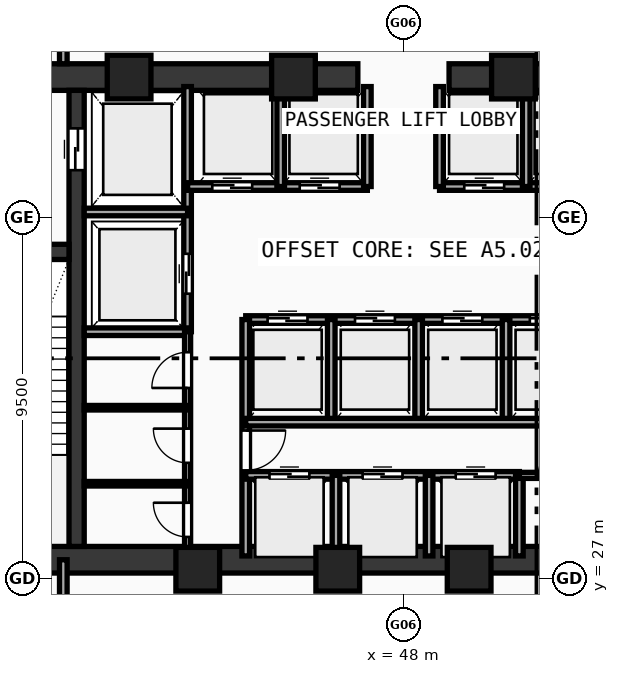
"""IFC4 building model, lengths in metres.
Left out: names, types, materials, properties, quantities, classifications, styles, units other than length and angle.
Written with IfcOpenShell. Run it as: python <this file> out.ifc"""

import sys

from ifc_helpers import new_model, si_unit, direction, frame, frame_2d, origin, origin_with_axes, origin_2d, place, context, subcontext, project, spatial, rectangle, hollow_rectangle, extrude, source, transform, mapped, element, fill, save


model = new_model("IFC4")
c1 = context("Model", 3, precision=1e-05, world=origin(), true_north=direction((0.0, 1.0)))
c2 = subcontext(c1, "Body", "Model", "MODEL_VIEW")
j1 = project(units=[si_unit("LENGTHUNIT", "METRE"), si_unit("PLANEANGLEUNIT", "RADIAN")], contexts=[c1])
p1 = place(None, origin())
s1 = spatial("IfcSite", under=j1, at=p1, CompositionType="ELEMENT")
p2 = place(p1, origin())
s2 = spatial("IfcBuilding", under=s1, at=p2, CompositionType="ELEMENT")
p3 = place(p2, origin())
s3 = spatial("IfcBuildingStorey", under=s2, at=p3, CompositionType="ELEMENT", Elevation=0.0)
p4 = place(p3, frame((35.45, 27.5, 0.0), z_axis=(0.0, 0.0, 1.0), x_axis=(1.0, 0.0, 0.0)))
e1 = element("IfcWall", 1, at=p4, inside=s3, PredefinedType="SHEAR", context=c2, shape_type="SweptSolid", body=[
    extrude(rectangle(XDim=25.1, YDim=0.7, at=frame_2d((12.55, 0.0))), origin(), (0.0, 0.0, 1.0), 4.52),
])
p5 = place(p3, frame((35.45, 40.2, 0.0), z_axis=(0.0, 0.0, 1.0), x_axis=(1.0, 0.0, 0.0)))
e2 = element("IfcWall", 2, at=p5, inside=s3, PredefinedType="SHEAR", context=c2, shape_type="SweptSolid", body=[
    extrude(rectangle(XDim=11.35, YDim=0.7, at=frame_2d((5.675, 0.0))), origin(), (0.0, 0.0, 1.0), 4.52),
])
p6 = place(p5, frame((1.7, 0.0, 0.0)))
e3 = element("IfcOpeningElement", 3, at=p6, cuts=e2, PredefinedType="OPENING", context=c2, shape_type="SweptSolid", body=[
    extrude(rectangle(XDim=1.05, YDim=2.1, at=frame_2d((0.525, 1.05))), frame((0.0, 0.36, 0.0), z_axis=(0.0, -1.0, 0.0), x_axis=(1.0, 0.0, 0.0)), (0.0, 0.0, 1.0), 0.72),
])
p7 = place(p3, frame((49.2, 40.2, 0.0), z_axis=(0.0, 0.0, 1.0), x_axis=(1.0, 0.0, 0.0)))
e4 = element("IfcWall", 4, at=p7, inside=s3, PredefinedType="SHEAR", context=c2, shape_type="SweptSolid", body=[
    extrude(rectangle(XDim=11.35, YDim=0.7, at=frame_2d((5.675, 0.0))), origin(), (0.0, 0.0, 1.0), 4.52),
])
p8 = place(p7, frame((8.6, 0.0, 0.0)))
e5 = element("IfcOpeningElement", 5, at=p8, cuts=e4, PredefinedType="OPENING", context=c2, shape_type="SweptSolid", body=[
    extrude(rectangle(XDim=1.05, YDim=2.1, at=frame_2d((0.525, 1.05))), frame((0.0, 0.36, 0.0), z_axis=(0.0, -1.0, 0.0), x_axis=(1.0, 0.0, 0.0)), (0.0, 0.0, 1.0), 0.72),
])
p9 = place(p3, frame((39.4, 27.85, 0.0), z_axis=(0.0, 0.0, 1.0), x_axis=(0.0, 1.0, 0.0)))
e6 = element("IfcWall", 6, at=p9, inside=s3, PredefinedType="SHEAR", context=c2, shape_type="SweptSolid", body=[
    extrude(rectangle(XDim=12.0, YDim=0.4, at=frame_2d((6.0, 0.0))), origin(), (0.0, 0.0, 1.0), 4.52),
])
p10 = place(p9, frame((9.9, 0.0, 0.0)))
e7 = element("IfcOpeningElement", 7, at=p10, cuts=e6, PredefinedType="OPENING", context=c2, shape_type="SweptSolid", body=[
    extrude(rectangle(XDim=1.1, YDim=2.1, at=frame_2d((0.55, 1.05))), frame((0.0, 0.21, 0.0), z_axis=(0.0, -1.0, 0.0), x_axis=(1.0, 0.0, 0.0)), (0.0, 0.0, 1.0), 0.42),
])
p11 = place(p3, frame((36.15, 35.6, 0.0), z_axis=(0.0, 0.0, 1.0), x_axis=(1.0, 0.0, 0.0)))
e8 = element("IfcWall", 8, at=p11, inside=s3, PredefinedType="SHEAR", context=c2, shape_type="SweptSolid", body=[
    extrude(rectangle(XDim=3.05, YDim=0.4, at=frame_2d((1.525, 0.0))), origin(), (0.0, 0.0, 1.0), 4.52),
])
p12 = place(p11, frame((0.97, 0.0, 0.0)))
e9 = element("IfcOpeningElement", 9, at=p12, cuts=e8, PredefinedType="OPENING", context=c2, shape_type="SweptSolid", body=[
    extrude(rectangle(XDim=1.05, YDim=2.1, at=frame_2d((0.525, 1.05))), frame((0.0, 0.21, 0.0), z_axis=(0.0, -1.0, 0.0), x_axis=(1.0, 0.0, 0.0)), (0.0, 0.0, 1.0), 0.42),
])
m1 = source(origin(), c2, "Body", "SweptSolid", [
    extrude(hollow_rectangle(XDim=1.15, YDim=1.15, WallThickness=0.048, at=origin_2d()), origin(), (0.0, 0.0, 1.0), 4.8),
])
for number, where, z_axis, x_axis in (
    (10, (42.588, 27.25, -0.28), (0.0, 0.0, 1.0), (1.0, 0.0, 0.0)),
    (11, (46.272, 27.25, -0.28), (0.0, 0.0, 1.0), (1.0, 0.0, 0.0)),
    (12, (49.729, 27.25, -0.28), (0.0, 0.0, 1.0), (1.0, 0.0, 0.0)),
    (13, (50.894, 40.2, -0.28), (0.0, 0.0, 1.0), (1.0, 0.0, 0.0)),
    (14, (45.106, 40.2, -0.28), (0.0, 0.0, 1.0), (1.0, 0.0, 0.0)),
    (15, (40.781, 40.2, -0.28), (0.0, 0.0, 1.0), (1.0, 0.0, 0.0)),
):
    element("IfcColumn", number, at=place(p3, frame(where, z_axis=z_axis, x_axis=x_axis)), inside=s3, PredefinedType="COLUMN", context=c2, shape_type="MappedRepresentation", body=[
        mapped(m1, transform((0.0, 0.0, 0.0), scale=1.0)),
    ])
p13 = place(p3, frame((42.32, 33.5, 0.0), z_axis=(0.0, 0.0, 1.0), x_axis=(0.0, 1.0, 0.0)))
e16 = element("IfcWall", 16, at=p13, inside=s3, PredefinedType="SOLIDWALL", context=c2, shape_type="SweptSolid", body=[
    extrude(rectangle(XDim=6.45, YDim=0.2, at=frame_2d((3.225, 0.0))), origin(), (0.0, 0.0, 1.0), 4.52),
])
p14 = place(p13, frame((1.0, 0.0, 0.0)))
e17 = element("IfcOpeningElement", 17, at=p14, cuts=e16, PredefinedType="OPENING", context=c2, shape_type="SweptSolid", body=[
    extrude(rectangle(XDim=1.05, YDim=2.1, at=frame_2d((0.525, 1.05))), frame((0.0, 0.11, 0.0), z_axis=(0.0, -1.0, 0.0), x_axis=(1.0, 0.0, 0.0)), (0.0, 0.0, 1.0), 0.22),
])
for number, where, z_axis, x_axis in (
    (18, (39.6, 36.65, 0.0), (0.0, 0.0, 1.0), (1.0, 0.0, 0.0)),
    (19, (39.6, 33.5, 0.0), (0.0, 0.0, 1.0), (1.0, 0.0, 0.0)),
):
    element("IfcWall", number, at=place(p3, frame(where, z_axis=z_axis, x_axis=x_axis)), inside=s3, PredefinedType="SOLIDWALL", context=c2, shape_type="SweptSolid", body=[
        extrude(rectangle(XDim=2.72, YDim=0.2, at=frame_2d((1.36, 0.0))), origin(), (0.0, 0.0, 1.0), 4.52),
    ])
p15 = place(p3, frame((42.32, 37.32, 0.0), z_axis=(0.0, 0.0, 1.0), x_axis=(1.0, 0.0, 0.0)))
e20 = element("IfcWall", 20, at=p15, inside=s3, PredefinedType="SOLIDWALL", context=c2, shape_type="SweptSolid", body=[
    extrude(rectangle(XDim=4.73, YDim=0.2, at=frame_2d((2.365, 0.0))), origin(), (0.0, 0.0, 1.0), 4.52),
])
p16 = place(p15, frame((0.65, 0.0, 0.0)))
e21 = element("IfcOpeningElement", 21, at=p16, cuts=e20, PredefinedType="OPENING", context=c2, shape_type="SweptSolid", body=[
    extrude(rectangle(XDim=1.05, YDim=2.1, at=frame_2d((0.525, 1.05))), frame((0.0, 0.11, 0.0), z_axis=(0.0, -1.0, 0.0), x_axis=(1.0, 0.0, 0.0)), (0.0, 0.0, 1.0), 0.22),
])
p17 = place(p15, frame((2.95, 0.0, 0.0)))
e22 = element("IfcOpeningElement", 22, at=p17, cuts=e20, PredefinedType="OPENING", context=c2, shape_type="SweptSolid", body=[
    extrude(rectangle(XDim=1.05, YDim=2.1, at=frame_2d((0.525, 1.05))), frame((0.0, 0.11, 0.0), z_axis=(0.0, -1.0, 0.0), x_axis=(1.0, 0.0, 0.0)), (0.0, 0.0, 1.0), 0.22),
])
p18 = place(p3, frame((48.95, 37.32, 0.0), z_axis=(0.0, 0.0, 1.0), x_axis=(1.0, 0.0, 0.0)))
e23 = element("IfcWall", 23, at=p18, inside=s3, PredefinedType="SOLIDWALL", context=c2, shape_type="SweptSolid", body=[
    extrude(rectangle(XDim=4.73, YDim=0.2, at=frame_2d((2.365, 0.0))), origin(), (0.0, 0.0, 1.0), 4.52),
])
p19 = place(p18, frame((0.65, 0.0, 0.0)))
e24 = element("IfcOpeningElement", 24, at=p19, cuts=e23, PredefinedType="OPENING", context=c2, shape_type="SweptSolid", body=[
    extrude(rectangle(XDim=1.05, YDim=2.1, at=frame_2d((0.525, 1.05))), frame((0.0, 0.11, 0.0), z_axis=(0.0, -1.0, 0.0), x_axis=(1.0, 0.0, 0.0)), (0.0, 0.0, 1.0), 0.22),
])
p20 = place(p18, frame((2.95, 0.0, 0.0)))
e25 = element("IfcOpeningElement", 25, at=p20, cuts=e23, PredefinedType="OPENING", context=c2, shape_type="SweptSolid", body=[
    extrude(rectangle(XDim=1.05, YDim=2.1, at=frame_2d((0.525, 1.05))), frame((0.0, 0.11, 0.0), z_axis=(0.0, -1.0, 0.0), x_axis=(1.0, 0.0, 0.0)), (0.0, 0.0, 1.0), 0.22),
])
for number, where, z_axis, x_axis in (
    (26, (47.05, 37.32, 0.0), (0.0, 0.0, 1.0), (0.0, 1.0, 0.0)),
    (27, (48.95, 37.32, 0.0), (0.0, 0.0, 1.0), (0.0, 1.0, 0.0)),
    (28, (44.77, 37.32, 0.0), (0.0, 0.0, 1.0), (0.0, 1.0, 0.0)),
    (29, (51.23, 37.32, 0.0), (0.0, 0.0, 1.0), (0.0, 1.0, 0.0)),
):
    element("IfcWall", number, at=place(p3, frame(where, z_axis=z_axis, x_axis=x_axis)), inside=s3, PredefinedType="SOLIDWALL", context=c2, shape_type="SweptSolid", body=[
        extrude(rectangle(XDim=2.63, YDim=0.2, at=frame_2d((1.315, 0.0))), origin(), (0.0, 0.0, 1.0), 4.52),
    ])
p21 = place(p3, frame((43.85, 33.82, 0.0), z_axis=(0.0, 0.0, 1.0), x_axis=(1.0, 0.0, 0.0)))
e30 = element("IfcWall", 30, at=p21, inside=s3, PredefinedType="SOLIDWALL", context=c2, shape_type="SweptSolid", body=[
    extrude(rectangle(XDim=9.83, YDim=0.2, at=frame_2d((4.915, 0.0))), origin(), (0.0, 0.0, 1.0), 4.52),
])
p22 = place(p21, frame((0.575, 0.0, 0.0)))
e31 = element("IfcOpeningElement", 31, at=p22, cuts=e30, PredefinedType="OPENING", context=c2, shape_type="SweptSolid", body=[
    extrude(rectangle(XDim=1.05, YDim=2.1, at=frame_2d((0.525, 1.05))), frame((0.0, 0.11, 0.0), z_axis=(0.0, -1.0, 0.0), x_axis=(1.0, 0.0, 0.0)), (0.0, 0.0, 1.0), 0.22),
])
p23 = place(p21, frame((2.875, 0.0, 0.0)))
e32 = element("IfcOpeningElement", 32, at=p23, cuts=e30, PredefinedType="OPENING", context=c2, shape_type="SweptSolid", body=[
    extrude(rectangle(XDim=1.05, YDim=2.1, at=frame_2d((0.525, 1.05))), frame((0.0, 0.11, 0.0), z_axis=(0.0, -1.0, 0.0), x_axis=(1.0, 0.0, 0.0)), (0.0, 0.0, 1.0), 0.22),
])
p24 = place(p21, frame((5.175, 0.0, 0.0)))
e33 = element("IfcOpeningElement", 33, at=p24, cuts=e30, PredefinedType="OPENING", context=c2, shape_type="SweptSolid", body=[
    extrude(rectangle(XDim=1.05, YDim=2.1, at=frame_2d((0.525, 1.05))), frame((0.0, 0.11, 0.0), z_axis=(0.0, -1.0, 0.0), x_axis=(1.0, 0.0, 0.0)), (0.0, 0.0, 1.0), 0.22),
])
p25 = place(p21, frame((7.475, 0.0, 0.0)))
e34 = element("IfcOpeningElement", 34, at=p25, cuts=e30, PredefinedType="OPENING", context=c2, shape_type="SweptSolid", body=[
    extrude(rectangle(XDim=1.05, YDim=2.1, at=frame_2d((0.525, 1.05))), frame((0.0, 0.11, 0.0), z_axis=(0.0, -1.0, 0.0), x_axis=(1.0, 0.0, 0.0)), (0.0, 0.0, 1.0), 0.22),
])
p26 = place(p3, frame((43.85, 27.6, 0.0), z_axis=(0.0, 0.0, 1.0), x_axis=(0.0, 1.0, 0.0)))
e35 = element("IfcWall", 35, at=p26, inside=s3, PredefinedType="SOLIDWALL", context=c2, shape_type="SweptSolid", body=[
    extrude(rectangle(XDim=6.22, YDim=0.2, at=frame_2d((3.11, 0.0))), origin(), (0.0, 0.0, 1.0), 4.52),
])
p27 = place(p26, frame((2.25, 0.0, 0.0)))
e36 = element("IfcOpeningElement", 36, at=p27, cuts=e35, PredefinedType="OPENING", context=c2, shape_type="SweptSolid", body=[
    extrude(rectangle(XDim=1.05, YDim=2.1, at=frame_2d((0.525, 1.05))), frame((0.0, 0.11, 0.0), z_axis=(0.0, -1.0, 0.0), x_axis=(1.0, 0.0, 0.0)), (0.0, 0.0, 1.0), 0.22),
])
for number, where, z_axis, x_axis in (
    (37, (46.1, 31.12, 0.0), (0.0, 0.0, 1.0), (0.0, 1.0, 0.0)),
    (38, (48.4, 31.12, 0.0), (0.0, 0.0, 1.0), (0.0, 1.0, 0.0)),
    (39, (50.7, 31.12, 0.0), (0.0, 0.0, 1.0), (0.0, 1.0, 0.0)),
):
    element("IfcWall", number, at=place(p3, frame(where, z_axis=z_axis, x_axis=x_axis)), inside=s3, PredefinedType="SOLIDWALL", context=c2, shape_type="SweptSolid", body=[
        extrude(rectangle(XDim=2.7, YDim=0.2, at=frame_2d((1.35, 0.0))), origin(), (0.0, 0.0, 1.0), 4.52),
    ])
p28 = place(p3, frame((43.85, 29.72, 0.0), z_axis=(0.0, 0.0, 1.0), x_axis=(1.0, 0.0, 0.0)))
e40 = element("IfcWall", 40, at=p28, inside=s3, PredefinedType="SOLIDWALL", context=c2, shape_type="SweptSolid", body=[
    extrude(rectangle(XDim=7.2, YDim=0.2, at=frame_2d((3.6, 0.0))), origin(), (0.0, 0.0, 1.0), 4.52),
])
p29 = place(p28, frame((0.625, 0.0, 0.0)))
e41 = element("IfcOpeningElement", 41, at=p29, cuts=e40, PredefinedType="OPENING", context=c2, shape_type="SweptSolid", body=[
    extrude(rectangle(XDim=1.05, YDim=2.1, at=frame_2d((0.525, 1.05))), frame((0.0, 0.11, 0.0), z_axis=(0.0, -1.0, 0.0), x_axis=(1.0, 0.0, 0.0)), (0.0, 0.0, 1.0), 0.22),
])
p30 = place(p28, frame((3.075, 0.0, 0.0)))
e42 = element("IfcOpeningElement", 42, at=p30, cuts=e40, PredefinedType="OPENING", context=c2, shape_type="SweptSolid", body=[
    extrude(rectangle(XDim=1.05, YDim=2.1, at=frame_2d((0.525, 1.05))), frame((0.0, 0.11, 0.0), z_axis=(0.0, -1.0, 0.0), x_axis=(1.0, 0.0, 0.0)), (0.0, 0.0, 1.0), 0.22),
])
p31 = place(p28, frame((5.525, 0.0, 0.0)))
e43 = element("IfcOpeningElement", 43, at=p31, cuts=e40, PredefinedType="OPENING", context=c2, shape_type="SweptSolid", body=[
    extrude(rectangle(XDim=1.05, YDim=2.1, at=frame_2d((0.525, 1.05))), frame((0.0, 0.11, 0.0), z_axis=(0.0, -1.0, 0.0), x_axis=(1.0, 0.0, 0.0)), (0.0, 0.0, 1.0), 0.22),
])
p32 = place(p3, frame((51.05, 27.6, 0.0), z_axis=(0.0, 0.0, 1.0), x_axis=(0.0, 1.0, 0.0)))
e44 = element("IfcWall", 44, at=p32, inside=s3, PredefinedType="SOLIDWALL", context=c2, shape_type="SweptSolid", body=[
    extrude(rectangle(XDim=2.12, YDim=0.2, at=frame_2d((1.06, 0.0))), origin(), (0.0, 0.0, 1.0), 4.52),
])
p33 = place(p3, frame((43.85, 31.12, 0.0), z_axis=(0.0, 0.0, 1.0), x_axis=(1.0, 0.0, 0.0)))
e45 = element("IfcWall", 45, at=p33, inside=s3, PredefinedType="SOLIDWALL", context=c2, shape_type="SweptSolid", body=[
    extrude(rectangle(XDim=9.83, YDim=0.2, at=frame_2d((4.915, 0.0))), origin(), (0.0, 0.0, 1.0), 4.52),
])
for number, where, z_axis, x_axis in (
    (46, (46.225, 27.6, 0.0), (0.0, 0.0, 1.0), (0.0, 1.0, 0.0)),
    (47, (48.675, 27.6, 0.0), (0.0, 0.0, 1.0), (0.0, 1.0, 0.0)),
):
    element("IfcWall", number, at=place(p3, frame(where, z_axis=z_axis, x_axis=x_axis)), inside=s3, PredefinedType="SOLIDWALL", context=c2, shape_type="SweptSolid", body=[
        extrude(rectangle(XDim=2.12, YDim=0.2, at=frame_2d((1.06, 0.0))), origin(), (0.0, 0.0, 1.0), 4.52),
    ])
p34 = place(p3, frame((42.32, 27.6, 0.0), z_axis=(0.0, 0.0, 1.0), x_axis=(0.0, 1.0, 0.0)))
e48 = element("IfcWall", 48, at=p34, inside=s3, PredefinedType="PARTITIONING", context=c2, shape_type="SweptSolid", body=[
    extrude(rectangle(XDim=5.9, YDim=0.16, at=frame_2d((2.95, 0.0))), origin(), (0.0, 0.0, 1.0), 4.52),
])
p35 = place(p34, frame((0.5, 0.0, 0.0)))
e49 = element("IfcOpeningElement", 49, at=p35, cuts=e48, PredefinedType="OPENING", context=c2, shape_type="SweptSolid", body=[
    extrude(rectangle(XDim=0.9, YDim=2.1, at=frame_2d((0.45, 1.05))), frame((0.0, 0.09, 0.0), z_axis=(0.0, -1.0, 0.0), x_axis=(1.0, 0.0, 0.0)), (0.0, 0.0, 1.0), 0.18),
])
p36 = place(p34, frame((2.45, 0.0, 0.0)))
e50 = element("IfcOpeningElement", 50, at=p36, cuts=e48, PredefinedType="OPENING", context=c2, shape_type="SweptSolid", body=[
    extrude(rectangle(XDim=0.9, YDim=2.1, at=frame_2d((0.45, 1.05))), frame((0.0, 0.09, 0.0), z_axis=(0.0, -1.0, 0.0), x_axis=(1.0, 0.0, 0.0)), (0.0, 0.0, 1.0), 0.18),
])
p37 = place(p34, frame((4.42, 0.0, 0.0)))
e51 = element("IfcOpeningElement", 51, at=p37, cuts=e48, PredefinedType="OPENING", context=c2, shape_type="SweptSolid", body=[
    extrude(rectangle(XDim=0.94, YDim=2.1, at=frame_2d((0.47, 1.05))), frame((0.0, 0.09, 0.0), z_axis=(0.0, -1.0, 0.0), x_axis=(1.0, 0.0, 0.0)), (0.0, 0.0, 1.0), 0.18),
])
p38 = place(p3, frame((51.05, 29.72, 0.0), z_axis=(0.0, 0.0, 1.0), x_axis=(1.0, 0.0, 0.0)))
e52 = element("IfcWall", 52, at=p38, inside=s3, PredefinedType="PARTITIONING", context=c2, shape_type="SweptSolid", body=[
    extrude(rectangle(XDim=4.07, YDim=0.16, at=frame_2d((2.035, 0.0))), origin(), (0.0, 0.0, 1.0), 4.52),
])
p39 = place(p38, frame((0.5, 0.0, 0.0)))
e53 = element("IfcOpeningElement", 53, at=p39, cuts=e52, PredefinedType="OPENING", context=c2, shape_type="SweptSolid", body=[
    extrude(rectangle(XDim=0.9, YDim=2.1, at=frame_2d((0.45, 1.05))), frame((0.0, 0.09, 0.0), z_axis=(0.0, -1.0, 0.0), x_axis=(1.0, 0.0, 0.0)), (0.0, 0.0, 1.0), 0.18),
])
for number, where, z_axis, x_axis in (
    (54, (39.6, 29.5, 0.0), (0.0, 0.0, 1.0), (1.0, 0.0, 0.0)),
    (55, (39.6, 31.5, 0.0), (0.0, 0.0, 1.0), (1.0, 0.0, 0.0)),
):
    element("IfcWall", number, at=place(p3, frame(where, z_axis=z_axis, x_axis=x_axis)), inside=s3, PredefinedType="PARTITIONING", context=c2, shape_type="SweptSolid", body=[
        extrude(rectangle(XDim=2.72, YDim=0.12, at=frame_2d((1.36, 0.0))), origin(), (0.0, 0.0, 1.0), 4.52),
    ])
p40 = place(p3, frame((39.05, 40.55, 0.0), z_axis=(0.0, 0.0, 1.0), x_axis=(0.0, 1.0, 0.0)))
e56 = element("IfcWall", 56, at=p40, inside=s3, PredefinedType="SOLIDWALL", context=c2, shape_type="SweptSolid", body=[
    extrude(rectangle(XDim=1.2, YDim=0.2, at=frame_2d((0.6, 0.0))), origin(), (0.0, 0.0, 1.0), 4.52),
])
p41 = place(p3, frame((39.05, 6.15, 0.0), z_axis=(0.0, 0.0, 1.0), x_axis=(0.0, 1.0, 0.0)))
e57 = element("IfcWall", 57, at=p41, inside=s3, PredefinedType="SOLIDWALL", context=c2, shape_type="SweptSolid", body=[
    extrude(rectangle(XDim=21.35, YDim=0.2, at=frame_2d((10.675, 0.0))), origin(), (0.0, 0.0, 1.0), 3.62),
])
p42 = place(p41, frame((11.5, 0.0, 0.0)))
e58 = element("IfcOpeningElement", 58, at=p42, cuts=e57, PredefinedType="OPENING", context=c2, shape_type="SweptSolid", body=[
    extrude(rectangle(XDim=1.05, YDim=2.1, at=frame_2d((0.525, 1.05))), frame((0.0, 0.11, 0.0), z_axis=(0.0, -1.0, 0.0), x_axis=(1.0, 0.0, 0.0)), (0.0, 0.0, 1.0), 0.22),
])
m2 = source(origin(), c2, "Body", "SweptSolid", [
    extrude(rectangle(XDim=1.1, YDim=2.1, at=frame_2d((0.55, 1.05))), frame((0.0, 0.025, 0.0), z_axis=(0.0, -1.0, 0.0), x_axis=(1.0, 0.0, 0.0)), (0.0, 0.0, 1.0), 0.05),
])
p43 = place(p10, frame((1.1, 0.0, 0.0), z_axis=(0.0, 0.0, 1.0), x_axis=(-1.0, 0.0, 0.0)))
e59 = element("IfcDoor", 59, at=p43, inside=s3, OperationType="DOUBLE_DOOR_SLIDING", PredefinedType="DOOR", context=c2, shape_type="MappedRepresentation", body=[
    mapped(m2, transform((0.0, 0.0, 0.0), scale=1.0)),
])
fill(e7, e59)
m3 = source(origin(), c2, "Body", "SweptSolid", [
    extrude(rectangle(XDim=1.05, YDim=2.1, at=frame_2d((0.525, 1.05))), frame((0.0, 0.025, 0.0), z_axis=(0.0, -1.0, 0.0), x_axis=(1.0, 0.0, 0.0)), (0.0, 0.0, 1.0), 0.05),
])
p44 = place(p14, origin_with_axes())
e60 = element("IfcDoor", 60, at=p44, inside=s3, OperationType="DOUBLE_DOOR_SLIDING", PredefinedType="DOOR", context=c2, shape_type="MappedRepresentation", body=[
    mapped(m3, transform((0.0, 0.0, 0.0), scale=1.0)),
])
fill(e17, e60)
p45 = place(p16, frame((1.05, 0.0, 0.0), z_axis=(0.0, 0.0, 1.0), x_axis=(-1.0, 0.0, 0.0)))
e61 = element("IfcDoor", 61, at=p45, inside=s3, OperationType="DOUBLE_DOOR_SLIDING", PredefinedType="DOOR", context=c2, shape_type="MappedRepresentation", body=[
    mapped(m3, transform((0.0, 0.0, 0.0), scale=1.0)),
])
fill(e21, e61)
p46 = place(p17, frame((1.05, 0.0, 0.0), z_axis=(0.0, 0.0, 1.0), x_axis=(-1.0, 0.0, 0.0)))
e62 = element("IfcDoor", 62, at=p46, inside=s3, OperationType="DOUBLE_DOOR_SLIDING", PredefinedType="DOOR", context=c2, shape_type="MappedRepresentation", body=[
    mapped(m3, transform((0.0, 0.0, 0.0), scale=1.0)),
])
fill(e22, e62)
p47 = place(p19, frame((1.05, 0.0, 0.0), z_axis=(0.0, 0.0, 1.0), x_axis=(-1.0, 0.0, 0.0)))
e63 = element("IfcDoor", 63, at=p47, inside=s3, OperationType="DOUBLE_DOOR_SLIDING", PredefinedType="DOOR", context=c2, shape_type="MappedRepresentation", body=[
    mapped(m3, transform((0.0, 0.0, 0.0), scale=1.0)),
])
fill(e24, e63)
p48 = place(p22, origin_with_axes())
e64 = element("IfcDoor", 64, at=p48, inside=s3, OperationType="DOUBLE_DOOR_SLIDING", PredefinedType="DOOR", context=c2, shape_type="MappedRepresentation", body=[
    mapped(m3, transform((0.0, 0.0, 0.0), scale=1.0)),
])
fill(e31, e64)
p49 = place(p23, origin_with_axes())
e65 = element("IfcDoor", 65, at=p49, inside=s3, OperationType="DOUBLE_DOOR_SLIDING", PredefinedType="DOOR", context=c2, shape_type="MappedRepresentation", body=[
    mapped(m3, transform((0.0, 0.0, 0.0), scale=1.0)),
])
fill(e32, e65)
p50 = place(p24, origin_with_axes())
e66 = element("IfcDoor", 66, at=p50, inside=s3, OperationType="DOUBLE_DOOR_SLIDING", PredefinedType="DOOR", context=c2, shape_type="MappedRepresentation", body=[
    mapped(m3, transform((0.0, 0.0, 0.0), scale=1.0)),
])
fill(e33, e66)
p51 = place(p25, origin_with_axes())
e67 = element("IfcDoor", 67, at=p51, inside=s3, OperationType="DOUBLE_DOOR_SLIDING", PredefinedType="DOOR", context=c2, shape_type="MappedRepresentation", body=[
    mapped(m3, transform((0.0, 0.0, 0.0), scale=1.0)),
])
fill(e34, e67)
p52 = place(p27, frame((1.05, 0.0, 0.0), z_axis=(0.0, 0.0, 1.0), x_axis=(-1.0, 0.0, 0.0)))
e68 = element("IfcDoor", 68, at=p52, inside=s3, OperationType="SINGLE_SWING_LEFT", PredefinedType="DOOR", context=c2, shape_type="MappedRepresentation", body=[
    mapped(m3, transform((0.0, 0.0, 0.0), scale=1.0)),
])
fill(e36, e68)
p53 = place(p29, origin_with_axes())
e69 = element("IfcDoor", 69, at=p53, inside=s3, OperationType="DOUBLE_DOOR_SLIDING", PredefinedType="DOOR", context=c2, shape_type="MappedRepresentation", body=[
    mapped(m3, transform((0.0, 0.0, 0.0), scale=1.0)),
])
fill(e41, e69)
p54 = place(p30, origin_with_axes())
e70 = element("IfcDoor", 70, at=p54, inside=s3, OperationType="DOUBLE_DOOR_SLIDING", PredefinedType="DOOR", context=c2, shape_type="MappedRepresentation", body=[
    mapped(m3, transform((0.0, 0.0, 0.0), scale=1.0)),
])
fill(e42, e70)
p55 = place(p31, origin_with_axes())
e71 = element("IfcDoor", 71, at=p55, inside=s3, OperationType="DOUBLE_DOOR_SLIDING", PredefinedType="DOOR", context=c2, shape_type="MappedRepresentation", body=[
    mapped(m3, transform((0.0, 0.0, 0.0), scale=1.0)),
])
fill(e43, e71)
m4 = source(origin(), c2, "Body", "SweptSolid", [
    extrude(rectangle(XDim=0.9, YDim=2.1, at=frame_2d((0.45, 1.05))), frame((0.0, 0.025, 0.0), z_axis=(0.0, -1.0, 0.0), x_axis=(1.0, 0.0, 0.0)), (0.0, 0.0, 1.0), 0.05),
])
p56 = place(p35, origin_with_axes())
e72 = element("IfcDoor", 72, at=p56, inside=s3, OperationType="SINGLE_SWING_RIGHT", PredefinedType="DOOR", context=c2, shape_type="MappedRepresentation", body=[
    mapped(m4, transform((0.0, 0.0, 0.0), scale=1.0)),
])
fill(e49, e72)
p57 = place(p36, origin_with_axes())
e73 = element("IfcDoor", 73, at=p57, inside=s3, OperationType="SINGLE_SWING_RIGHT", PredefinedType="DOOR", context=c2, shape_type="MappedRepresentation", body=[
    mapped(m4, transform((0.0, 0.0, 0.0), scale=1.0)),
])
fill(e50, e73)
m5 = source(origin(), c2, "Body", "SweptSolid", [
    extrude(rectangle(XDim=0.94, YDim=2.1, at=frame_2d((0.47, 1.05))), frame((0.0, 0.025, 0.0), z_axis=(0.0, -1.0, 0.0), x_axis=(1.0, 0.0, 0.0)), (0.0, 0.0, 1.0), 0.05),
])
p58 = place(p37, origin_with_axes())
e74 = element("IfcDoor", 74, at=p58, inside=s3, OperationType="SINGLE_SWING_LEFT", PredefinedType="DOOR", context=c2, shape_type="MappedRepresentation", body=[
    mapped(m5, transform((0.0, 0.0, 0.0), scale=1.0)),
])
fill(e51, e74)
p59 = place(p39, origin_with_axes())
e75 = element("IfcDoor", 75, at=p59, inside=s3, OperationType="SINGLE_SWING_RIGHT", PredefinedType="DOOR", context=c2, shape_type="MappedRepresentation", body=[
    mapped(m4, transform((0.0, 0.0, 0.0), scale=1.0)),
])
fill(e53, e75)
save(model, sys.argv[1])
